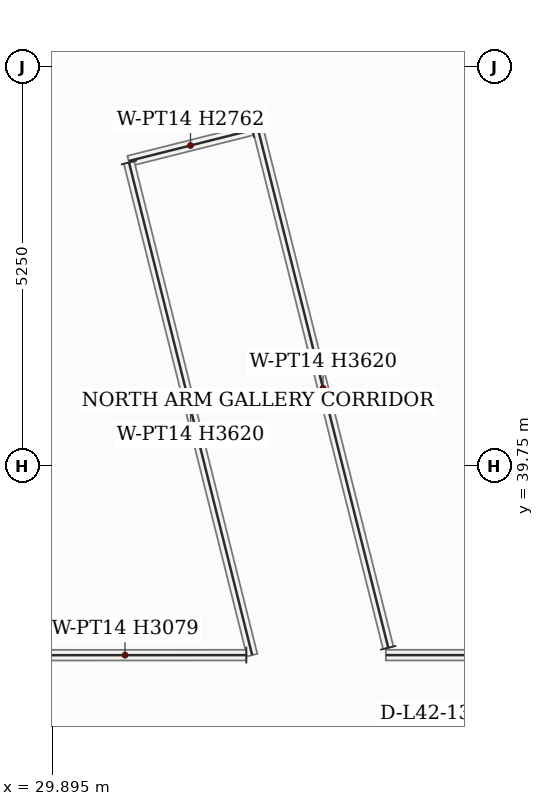
"""IFC4 building model, lengths in metres.
Left out: names, types, materials, properties, quantities, classifications, styles, units other than length and angle.
Written with IfcOpenShell. Run it as: python <this file> out.ifc"""

import sys

from ifc_helpers import new_model, si_unit, direction, frame, frame_2d, origin, place, context, subcontext, project, spatial, rectangle, extrude, source, transform, mapped, element, save


model = new_model("IFC4")
c1 = context("Model", 3, precision=1e-05, world=origin(), true_north=direction((0.0, 1.0)))
c2 = subcontext(c1, "Body", "Model", "MODEL_VIEW")
j1 = project(units=[si_unit("LENGTHUNIT", "METRE"), si_unit("PLANEANGLEUNIT", "RADIAN")], contexts=[c1])
p1 = place(None, origin())
s1 = spatial("IfcSite", under=j1, at=p1, CompositionType="ELEMENT")
p2 = place(p1, origin())
s2 = spatial("IfcBuilding", under=s1, at=p2, CompositionType="ELEMENT")
p3 = place(p2, frame((0.0, 0.0, 182.4)))
s3 = spatial("IfcBuildingStorey", under=s2, at=p3, CompositionType="ELEMENT", Elevation=182.4)
p4 = place(p3, frame((42.088, 37.26, 0.0), z_axis=(0.0, 0.0, 1.0), x_axis=(-1.0, 0.0, 0.0)))
e1 = element("IfcWall", 1, at=p4, inside=s3, PredefinedType="PARTITIONING", context=c2, shape_type="SweptSolid", body=[
    extrude(rectangle(XDim=7.806, YDim=0.14, at=frame_2d((3.903, 0.0))), origin(), (0.0, 0.0, 1.0), 3.62),
])
p5 = place(p4, frame((5.348, 0.0, 0.0)))
e2 = element("IfcOpeningElement", 2, at=p5, cuts=e1, PredefinedType="OPENING", context=c2, shape_type="SweptSolid", body=[
    extrude(rectangle(XDim=0.95, YDim=2.15, at=frame_2d((0.475, 1.075))), frame((0.0, 0.08, 0.0), z_axis=(0.0, -1.0, 0.0), x_axis=(1.0, 0.0, 0.0)), (0.0, 0.0, 1.0), 0.16),
])
m1 = source(origin(), c2, "Body", "SweptSolid", [
    extrude(rectangle(XDim=7.043, YDim=0.14, at=frame_2d((3.521, 0.0))), origin(), (0.0, 0.0, 1.0), 3.62),
])
p6 = place(p3, frame((34.313, 37.356, 0.0), z_axis=(0.0, 0.0, 1.0), x_axis=(-0.243587652837, 0.969878886968, 0.0)))
e3 = element("IfcWall", 3, at=p6, inside=s3, PredefinedType="PARTITIONING", context=c2, shape_type="MappedRepresentation", body=[
    mapped(m1, transform((0.0, 0.0, 0.0), x_axis=(1.0, 0.0, 0.0), y_axis=(0.0, 1.0, 0.0), z_axis=(0.0, 0.0, 1.0), scale=1.0)),
])
m2 = source(origin(), c2, "Body", "SweptSolid", [
    extrude(rectangle(XDim=1.678, YDim=0.14, at=frame_2d((0.839, 0.0))), origin(), (0.0, 0.0, 1.0), 2.762),
])
p7 = place(p3, frame((32.525, 44.169, 0.0), z_axis=(0.0, 0.0, 1.0), x_axis=(-0.969876563393, -0.243596904294, 0.0)))
e4 = element("IfcWall", 4, at=p7, inside=s3, PredefinedType="PARTITIONING", context=c2, shape_type="MappedRepresentation", body=[
    mapped(m2, transform((0.0, 0.0, 0.0), x_axis=(1.0, 0.0, 0.0), y_axis=(0.0, 1.0, 0.0), z_axis=(0.0, 0.0, 1.0), scale=1.0)),
])
m3 = source(origin(), c2, "Body", "SweptSolid", [
    extrude(rectangle(XDim=6.681, YDim=0.14, at=frame_2d((3.34, 0.0))), origin(), (0.0, 0.0, 1.0), 3.62),
])
p8 = place(p3, frame((30.903, 43.741, 0.0), z_axis=(0.0, 0.0, 1.0), x_axis=(0.242544223675, -0.970140350445, 0.0)))
e5 = element("IfcWall", 5, at=p8, inside=s3, PredefinedType="PARTITIONING", context=c2, shape_type="MappedRepresentation", body=[
    mapped(m3, transform((0.0, 0.0, 0.0), x_axis=(1.0, 0.0, 0.0), y_axis=(0.0, 1.0, 0.0), z_axis=(0.0, 0.0, 1.0), scale=1.0)),
])
m4 = source(origin(), c2, "Body", "SweptSolid", [
    extrude(rectangle(XDim=3.191, YDim=0.14, at=frame_2d((1.595, 0.0))), origin(), (0.0, 0.0, 1.0), 3.079),
])
p9 = place(p3, frame((32.446, 37.26, 0.0), z_axis=(0.0, 0.0, 1.0), x_axis=(-0.999999926826, -0.000382555443, 0.0)))
e6 = element("IfcWall", 6, at=p9, inside=s3, PredefinedType="PARTITIONING", context=c2, shape_type="MappedRepresentation", body=[
    mapped(m4, transform((0.0, 0.0, 0.0), x_axis=(1.0, 0.0, 0.0), y_axis=(0.0, 1.0, 0.0), z_axis=(0.0, 0.0, 1.0), scale=1.0)),
])
save(model, sys.argv[1])
